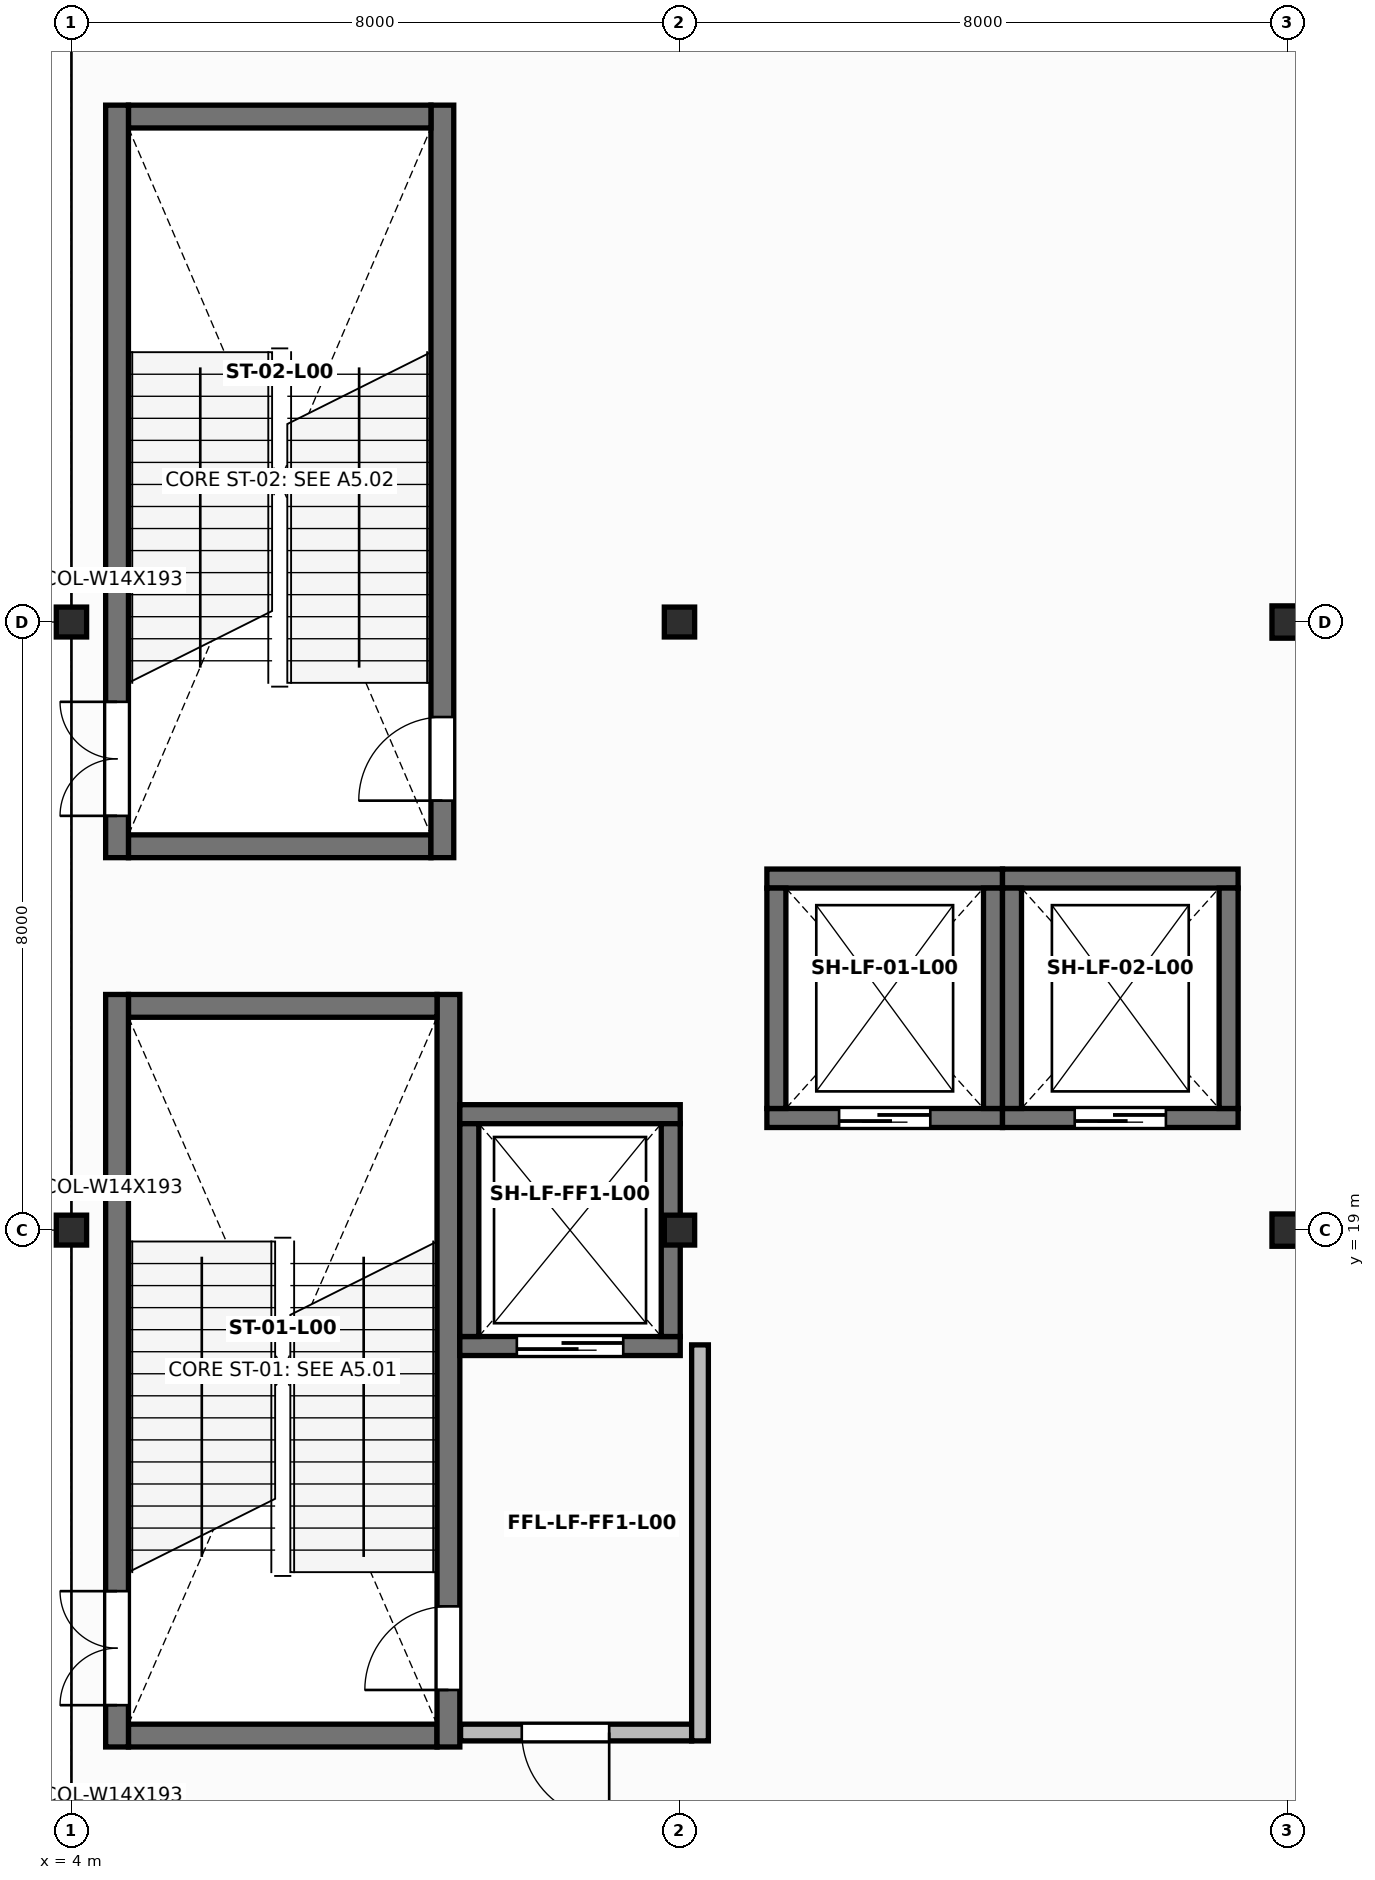
"""IFC4 building model, lengths in metres.
Left out: names, types, materials, properties, quantities, classifications, styles, units other than length and angle.
Written with IfcOpenShell. Run it as: python <this file> out.ifc"""

import sys

from ifc_helpers import new_model, si_unit, direction, frame, frame_2d, origin, origin_2d, place, context, subcontext, project, spatial, rectangle, i_section, extrude, element, fill, save


model = new_model("IFC4")
c1 = context("Model", 3, precision=1e-05, world=origin(), true_north=direction((0.0, 1.0)))
c2 = subcontext(c1, "Body", "Model", "MODEL_VIEW")
j1 = project(units=[si_unit("LENGTHUNIT", "METRE"), si_unit("PLANEANGLEUNIT", "RADIAN")], contexts=[c1])
p1 = place(None, origin())
s1 = spatial("IfcSite", under=j1, at=p1, CompositionType="ELEMENT")
p2 = place(p1, origin())
s2 = spatial("IfcBuilding", under=s1, at=p2, CompositionType="ELEMENT")
p3 = place(p2, origin())
s3 = spatial("IfcBuildingStorey", under=s2, at=p3, CompositionType="ELEMENT", Elevation=0.0)
for number, where, z_axis, x_axis in (
    (1, (4.0, 19.0, 0.0), (0.0, 0.0, 1.0), (1.0, 0.0, 0.0)),
    (2, (4.0, 27.0, 0.0), (0.0, 0.0, 1.0), (1.0, 0.0, 0.0)),
    (3, (12.0, 19.0, 0.0), (0.0, 0.0, 1.0), (1.0, 0.0, 0.0)),
    (4, (12.0, 27.0, 0.0), (0.0, 0.0, 1.0), (1.0, 0.0, 0.0)),
):
    element("IfcColumn", number, at=place(p3, frame(where, z_axis=z_axis, x_axis=x_axis)), inside=s3, PredefinedType="COLUMN", context=c2, shape_type="SweptSolid", body=[
        extrude(i_section(OverallWidth=0.399, OverallDepth=0.393, WebThickness=0.023, FlangeThickness=0.037, at=origin_2d()), origin(), (0.0, 0.0, 1.0), 6.0),
    ])
for number, where, z_axis, x_axis in (
    (5, (20.0, 19.0, 0.0), (0.0, 0.0, 1.0), (1.0, 0.0, 0.0)),
    (6, (20.0, 27.0, 0.0), (0.0, 0.0, 1.0), (1.0, 0.0, 0.0)),
):
    element("IfcColumn", number, at=place(p3, frame(where, z_axis=z_axis, x_axis=x_axis)), inside=s3, PredefinedType="COLUMN", context=c2, shape_type="SweptSolid", body=[
        extrude(i_section(OverallWidth=0.409, OverallDepth=0.425, WebThickness=0.033, FlangeThickness=0.052, at=origin_2d()), origin(), (0.0, 0.0, 1.0), 6.0),
    ])
p4 = place(p3, frame((4.75, 12.35, 0.0), z_axis=(0.0, 0.0, 1.0), x_axis=(1.0, 0.0, 0.0)))
e7 = element("IfcWall", 7, at=p4, inside=s3, PredefinedType="SHEAR", context=c2, shape_type="SweptSolid", body=[
    extrude(rectangle(XDim=4.06, YDim=0.3, at=frame_2d((2.03, 0.0))), origin(), (0.0, 0.0, 1.0), 5.755),
])
p5 = place(p3, frame((8.96, 12.2, 0.0), z_axis=(0.0, 0.0, 1.0), x_axis=(0.0, 1.0, 0.0)))
e8 = element("IfcWall", 8, at=p5, inside=s3, PredefinedType="SHEAR", context=c2, shape_type="SweptSolid", body=[
    extrude(rectangle(XDim=9.9, YDim=0.3, at=frame_2d((4.95, 0.0))), origin(), (0.0, 0.0, 1.0), 5.755),
])
p6 = place(p5, frame((0.75, 0.0, 0.0)))
e9 = element("IfcOpeningElement", 9, at=p6, cuts=e8, PredefinedType="OPENING", context=c2, shape_type="SweptSolid", body=[
    extrude(rectangle(XDim=1.1, YDim=2.15, at=frame_2d((0.55, 1.075))), frame((0.0, 0.16, 0.0), z_axis=(0.0, -1.0, 0.0), x_axis=(1.0, 0.0, 0.0)), (0.0, 0.0, 1.0), 0.32),
])
p7 = place(p3, frame((8.81, 21.95, 0.0), z_axis=(0.0, 0.0, 1.0), x_axis=(-1.0, 0.0, 0.0)))
e10 = element("IfcWall", 10, at=p7, inside=s3, PredefinedType="SHEAR", context=c2, shape_type="SweptSolid", body=[
    extrude(rectangle(XDim=4.06, YDim=0.3, at=frame_2d((2.03, 0.0))), origin(), (0.0, 0.0, 1.0), 5.755),
])
p8 = place(p3, frame((4.6, 22.1, 0.0), z_axis=(0.0, 0.0, 1.0), x_axis=(0.0, -1.0, 0.0)))
e11 = element("IfcWall", 11, at=p8, inside=s3, PredefinedType="SHEAR", context=c2, shape_type="SweptSolid", body=[
    extrude(rectangle(XDim=9.9, YDim=0.3, at=frame_2d((4.95, 0.0))), origin(), (0.0, 0.0, 1.0), 5.755),
])
p9 = place(p8, frame((7.85, 0.0, 0.0)))
e12 = element("IfcOpeningElement", 12, at=p9, cuts=e11, PredefinedType="OPENING", context=c2, shape_type="SweptSolid", body=[
    extrude(rectangle(XDim=1.5, YDim=2.2, at=frame_2d((0.75, 1.1))), frame((0.0, 0.16, 0.0), z_axis=(0.0, -1.0, 0.0), x_axis=(1.0, 0.0, 0.0)), (0.0, 0.0, 1.0), 0.32),
])
p10 = place(p3, frame((4.75, 24.05, 0.0), z_axis=(0.0, 0.0, 1.0), x_axis=(1.0, 0.0, 0.0)))
e13 = element("IfcWall", 13, at=p10, inside=s3, PredefinedType="SHEAR", context=c2, shape_type="SweptSolid", body=[
    extrude(rectangle(XDim=3.98, YDim=0.3, at=frame_2d((1.99, 0.0))), origin(), (0.0, 0.0, 1.0), 5.755),
])
p11 = place(p3, frame((8.88, 23.9, 0.0), z_axis=(0.0, 0.0, 1.0), x_axis=(0.0, 1.0, 0.0)))
e14 = element("IfcWall", 14, at=p11, inside=s3, PredefinedType="SHEAR", context=c2, shape_type="SweptSolid", body=[
    extrude(rectangle(XDim=9.9, YDim=0.3, at=frame_2d((4.95, 0.0))), origin(), (0.0, 0.0, 1.0), 5.755),
])
p12 = place(p11, frame((0.75, 0.0, 0.0)))
e15 = element("IfcOpeningElement", 15, at=p12, cuts=e14, PredefinedType="OPENING", context=c2, shape_type="SweptSolid", body=[
    extrude(rectangle(XDim=1.1, YDim=2.15, at=frame_2d((0.55, 1.075))), frame((0.0, 0.16, 0.0), z_axis=(0.0, -1.0, 0.0), x_axis=(1.0, 0.0, 0.0)), (0.0, 0.0, 1.0), 0.32),
])
p13 = place(p3, frame((8.73, 33.65, 0.0), z_axis=(0.0, 0.0, 1.0), x_axis=(-1.0, 0.0, 0.0)))
e16 = element("IfcWall", 16, at=p13, inside=s3, PredefinedType="SHEAR", context=c2, shape_type="SweptSolid", body=[
    extrude(rectangle(XDim=3.98, YDim=0.3, at=frame_2d((1.99, 0.0))), origin(), (0.0, 0.0, 1.0), 5.755),
])
p14 = place(p3, frame((4.6, 33.8, 0.0), z_axis=(0.0, 0.0, 1.0), x_axis=(0.0, -1.0, 0.0)))
e17 = element("IfcWall", 17, at=p14, inside=s3, PredefinedType="SHEAR", context=c2, shape_type="SweptSolid", body=[
    extrude(rectangle(XDim=9.9, YDim=0.3, at=frame_2d((4.95, 0.0))), origin(), (0.0, 0.0, 1.0), 5.755),
])
p15 = place(p14, frame((7.85, 0.0, 0.0)))
e18 = element("IfcOpeningElement", 18, at=p15, cuts=e17, PredefinedType="OPENING", context=c2, shape_type="SweptSolid", body=[
    extrude(rectangle(XDim=1.5, YDim=2.2, at=frame_2d((0.75, 1.1))), frame((0.0, 0.16, 0.0), z_axis=(0.0, -1.0, 0.0), x_axis=(1.0, 0.0, 0.0)), (0.0, 0.0, 1.0), 0.32),
])
p16 = place(p3, frame((9.11, 17.475, 0.0), z_axis=(0.0, 0.0, 1.0), x_axis=(1.0, 0.0, 0.0)))
e19 = element("IfcWall", 19, at=p16, inside=s3, PredefinedType="SOLIDWALL", context=c2, shape_type="SweptSolid", body=[
    extrude(rectangle(XDim=2.9, YDim=0.25, at=frame_2d((1.45, 0.0))), origin(), (0.0, 0.0, 1.0), 5.755),
])
p17 = place(p16, frame((0.75, 0.0, 0.0)))
e20 = element("IfcOpeningElement", 20, at=p17, cuts=e19, PredefinedType="OPENING", context=c2, shape_type="SweptSolid", body=[
    extrude(rectangle(XDim=1.4, YDim=2.25, at=frame_2d((0.7, 1.125))), frame((0.0, 0.135, 0.0), z_axis=(0.0, -1.0, 0.0), x_axis=(1.0, 0.0, 0.0)), (0.0, 0.0, 1.0), 0.27),
])
p18 = place(p3, frame((12.01, 20.525, 0.0), z_axis=(0.0, 0.0, 1.0), x_axis=(-1.0, 0.0, 0.0)))
e21 = element("IfcWall", 21, at=p18, inside=s3, PredefinedType="SOLIDWALL", context=c2, shape_type="SweptSolid", body=[
    extrude(rectangle(XDim=2.9, YDim=0.25, at=frame_2d((1.45, 0.0))), origin(), (0.0, 0.0, 1.0), 5.755),
])
for number, where, z_axis, x_axis in (
    (22, (11.885, 17.6, 0.0), (0.0, 0.0, 1.0), (0.0, 1.0, 0.0)),
    (23, (9.235, 20.4, 0.0), (0.0, 0.0, 1.0), (0.0, -1.0, 0.0)),
):
    element("IfcWall", number, at=place(p3, frame(where, z_axis=z_axis, x_axis=x_axis)), inside=s3, PredefinedType="SOLIDWALL", context=c2, shape_type="SweptSolid", body=[
        extrude(rectangle(XDim=2.8, YDim=0.25, at=frame_2d((1.4, 0.0))), origin(), (0.0, 0.0, 1.0), 5.755),
    ])
p19 = place(p3, frame((9.12, 12.39, 0.0), z_axis=(0.0, 0.0, 1.0), x_axis=(1.0, 0.0, 0.0)))
e24 = element("IfcWall", 24, at=p19, inside=s3, PredefinedType="SOLIDWALL", context=c2, shape_type="SweptSolid", body=[
    extrude(rectangle(XDim=3.04, YDim=0.22, at=frame_2d((1.52, 0.0))), origin(), (0.0, 0.0, 1.0), 4.976),
])
p20 = place(p19, frame((0.805, 0.0, 0.0)))
e25 = element("IfcOpeningElement", 25, at=p20, cuts=e24, PredefinedType="OPENING", context=c2, shape_type="SweptSolid", body=[
    extrude(rectangle(XDim=1.15, YDim=2.15, at=frame_2d((0.575, 1.075))), frame((0.0, 0.12, 0.0), z_axis=(0.0, -1.0, 0.0), x_axis=(1.0, 0.0, 0.0)), (0.0, 0.0, 1.0), 0.24),
])
p21 = place(p3, frame((12.27, 12.28, 0.0), z_axis=(0.0, 0.0, 1.0), x_axis=(0.0, 1.0, 0.0)))
e26 = element("IfcWall", 26, at=p21, inside=s3, PredefinedType="SOLIDWALL", context=c2, shape_type="SweptSolid", body=[
    extrude(rectangle(XDim=5.21, YDim=0.22, at=frame_2d((2.605, 0.0))), origin(), (0.0, 0.0, 1.0), 5.755),
])
p22 = place(p3, frame((13.15, 20.475, 0.0), z_axis=(0.0, 0.0, 1.0), x_axis=(1.0, 0.0, 0.0)))
e27 = element("IfcWall", 27, at=p22, inside=s3, PredefinedType="SOLIDWALL", context=c2, shape_type="SweptSolid", body=[
    extrude(rectangle(XDim=3.1, YDim=0.25, at=frame_2d((1.55, 0.0))), origin(), (0.0, 0.0, 1.0), 5.755),
])
p23 = place(p22, frame((0.95, 0.0, 0.0)))
e28 = element("IfcOpeningElement", 28, at=p23, cuts=e27, PredefinedType="OPENING", context=c2, shape_type="SweptSolid", body=[
    extrude(rectangle(XDim=1.2, YDim=2.2, at=frame_2d((0.6, 1.1))), frame((0.0, 0.135, 0.0), z_axis=(0.0, -1.0, 0.0), x_axis=(1.0, 0.0, 0.0)), (0.0, 0.0, 1.0), 0.27),
])
p24 = place(p3, frame((16.25, 23.625, 0.0), z_axis=(0.0, 0.0, 1.0), x_axis=(-1.0, 0.0, 0.0)))
e29 = element("IfcWall", 29, at=p24, inside=s3, PredefinedType="SOLIDWALL", context=c2, shape_type="SweptSolid", body=[
    extrude(rectangle(XDim=3.1, YDim=0.25, at=frame_2d((1.55, 0.0))), origin(), (0.0, 0.0, 1.0), 5.755),
])
for number, where, z_axis, x_axis in (
    (30, (16.125, 20.6, 0.0), (0.0, 0.0, 1.0), (0.0, 1.0, 0.0)),
    (31, (13.275, 23.5, 0.0), (0.0, 0.0, 1.0), (0.0, -1.0, 0.0)),
):
    element("IfcWall", number, at=place(p3, frame(where, z_axis=z_axis, x_axis=x_axis)), inside=s3, PredefinedType="SOLIDWALL", context=c2, shape_type="SweptSolid", body=[
        extrude(rectangle(XDim=2.9, YDim=0.25, at=frame_2d((1.45, 0.0))), origin(), (0.0, 0.0, 1.0), 5.755),
    ])
p25 = place(p3, frame((16.25, 20.475, 0.0), z_axis=(0.0, 0.0, 1.0), x_axis=(1.0, 0.0, 0.0)))
e32 = element("IfcWall", 32, at=p25, inside=s3, PredefinedType="SOLIDWALL", context=c2, shape_type="SweptSolid", body=[
    extrude(rectangle(XDim=3.1, YDim=0.25, at=frame_2d((1.55, 0.0))), origin(), (0.0, 0.0, 1.0), 5.755),
])
p26 = place(p25, frame((0.95, 0.0, 0.0)))
e33 = element("IfcOpeningElement", 33, at=p26, cuts=e32, PredefinedType="OPENING", context=c2, shape_type="SweptSolid", body=[
    extrude(rectangle(XDim=1.2, YDim=2.2, at=frame_2d((0.6, 1.1))), frame((0.0, 0.135, 0.0), z_axis=(0.0, -1.0, 0.0), x_axis=(1.0, 0.0, 0.0)), (0.0, 0.0, 1.0), 0.27),
])
p27 = place(p3, frame((19.35, 23.625, 0.0), z_axis=(0.0, 0.0, 1.0), x_axis=(-1.0, 0.0, 0.0)))
e34 = element("IfcWall", 34, at=p27, inside=s3, PredefinedType="SOLIDWALL", context=c2, shape_type="SweptSolid", body=[
    extrude(rectangle(XDim=3.1, YDim=0.25, at=frame_2d((1.55, 0.0))), origin(), (0.0, 0.0, 1.0), 5.755),
])
for number, where, z_axis, x_axis in (
    (35, (19.225, 20.6, 0.0), (0.0, 0.0, 1.0), (0.0, 1.0, 0.0)),
    (36, (16.375, 23.5, 0.0), (0.0, 0.0, 1.0), (0.0, -1.0, 0.0)),
):
    element("IfcWall", number, at=place(p3, frame(where, z_axis=z_axis, x_axis=x_axis)), inside=s3, PredefinedType="SOLIDWALL", context=c2, shape_type="SweptSolid", body=[
        extrude(rectangle(XDim=2.9, YDim=0.25, at=frame_2d((1.45, 0.0))), origin(), (0.0, 0.0, 1.0), 5.755),
    ])
p28 = place(p6, origin())
e37 = element("IfcDoor", 37, at=p28, inside=s3, OperationType="SINGLE_SWING_LEFT", PredefinedType="DOOR", context=c2, shape_type="SweptSolid", body=[
    extrude(rectangle(XDim=1.1, YDim=2.15, at=frame_2d((0.55, 1.075))), frame((0.0, 0.025, 0.0), z_axis=(0.0, -1.0, 0.0), x_axis=(1.0, 0.0, 0.0)), (0.0, 0.0, 1.0), 0.05),
])
fill(e9, e37)
p29 = place(p9, frame((1.5, 0.0, 0.0), z_axis=(0.0, 0.0, 1.0), x_axis=(-1.0, 0.0, 0.0)))
e38 = element("IfcDoor", 38, at=p29, inside=s3, OperationType="DOUBLE_DOOR_SINGLE_SWING", PredefinedType="DOOR", context=c2, shape_type="SweptSolid", body=[
    extrude(rectangle(XDim=1.5, YDim=2.2, at=frame_2d((0.75, 1.1))), frame((0.0, 0.025, 0.0), z_axis=(0.0, -1.0, 0.0), x_axis=(1.0, 0.0, 0.0)), (0.0, 0.0, 1.0), 0.05),
])
fill(e12, e38)
p30 = place(p12, origin())
e39 = element("IfcDoor", 39, at=p30, inside=s3, OperationType="SINGLE_SWING_LEFT", PredefinedType="DOOR", context=c2, shape_type="SweptSolid", body=[
    extrude(rectangle(XDim=1.1, YDim=2.15, at=frame_2d((0.55, 1.075))), frame((0.0, 0.025, 0.0), z_axis=(0.0, -1.0, 0.0), x_axis=(1.0, 0.0, 0.0)), (0.0, 0.0, 1.0), 0.05),
])
fill(e15, e39)
p31 = place(p15, frame((1.5, 0.0, 0.0), z_axis=(0.0, 0.0, 1.0), x_axis=(-1.0, 0.0, 0.0)))
e40 = element("IfcDoor", 40, at=p31, inside=s3, OperationType="DOUBLE_DOOR_SINGLE_SWING", PredefinedType="DOOR", context=c2, shape_type="SweptSolid", body=[
    extrude(rectangle(XDim=1.5, YDim=2.2, at=frame_2d((0.75, 1.1))), frame((0.0, 0.025, 0.0), z_axis=(0.0, -1.0, 0.0), x_axis=(1.0, 0.0, 0.0)), (0.0, 0.0, 1.0), 0.05),
])
fill(e18, e40)
p32 = place(p17, frame((1.4, 0.0, 0.0), z_axis=(0.0, 0.0, 1.0), x_axis=(-1.0, 0.0, 0.0)))
e41 = element("IfcDoor", 41, at=p32, inside=s3, OperationType="DOUBLE_DOOR_SLIDING", PredefinedType="DOOR", context=c2, shape_type="SweptSolid", body=[
    extrude(rectangle(XDim=1.4, YDim=2.25, at=frame_2d((0.7, 1.125))), frame((0.0, 0.025, 0.0), z_axis=(0.0, -1.0, 0.0), x_axis=(1.0, 0.0, 0.0)), (0.0, 0.0, 1.0), 0.05),
])
fill(e20, e41)
p33 = place(p20, frame((1.15, 0.0, 0.0), z_axis=(0.0, 0.0, 1.0), x_axis=(-1.0, 0.0, 0.0)))
e42 = element("IfcDoor", 42, at=p33, inside=s3, OperationType="SINGLE_SWING_RIGHT", PredefinedType="DOOR", context=c2, shape_type="SweptSolid", body=[
    extrude(rectangle(XDim=1.15, YDim=2.15, at=frame_2d((0.575, 1.075))), frame((0.0, 0.025, 0.0), z_axis=(0.0, -1.0, 0.0), x_axis=(1.0, 0.0, 0.0)), (0.0, 0.0, 1.0), 0.05),
])
fill(e25, e42)
p34 = place(p23, frame((1.2, 0.0, 0.0), z_axis=(0.0, 0.0, 1.0), x_axis=(-1.0, 0.0, 0.0)))
e43 = element("IfcDoor", 43, at=p34, inside=s3, OperationType="DOUBLE_DOOR_SLIDING", PredefinedType="DOOR", context=c2, shape_type="SweptSolid", body=[
    extrude(rectangle(XDim=1.2, YDim=2.2, at=frame_2d((0.6, 1.1))), frame((0.0, 0.025, 0.0), z_axis=(0.0, -1.0, 0.0), x_axis=(1.0, 0.0, 0.0)), (0.0, 0.0, 1.0), 0.05),
])
fill(e28, e43)
p35 = place(p26, frame((1.2, 0.0, 0.0), z_axis=(0.0, 0.0, 1.0), x_axis=(-1.0, 0.0, 0.0)))
e44 = element("IfcDoor", 44, at=p35, inside=s3, OperationType="DOUBLE_DOOR_SLIDING", PredefinedType="DOOR", context=c2, shape_type="SweptSolid", body=[
    extrude(rectangle(XDim=1.2, YDim=2.2, at=frame_2d((0.6, 1.1))), frame((0.0, 0.025, 0.0), z_axis=(0.0, -1.0, 0.0), x_axis=(1.0, 0.0, 0.0)), (0.0, 0.0, 1.0), 0.05),
])
fill(e33, e44)
save(model, sys.argv[1])
